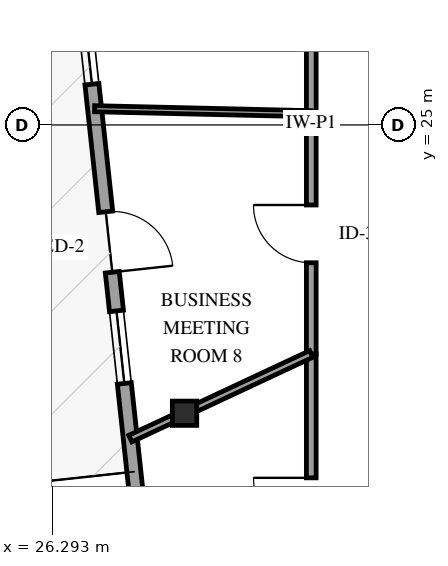
"""IFC4 building model, lengths in metres.
Left out: names, types, materials, properties, quantities, classifications, styles, units other than length and angle.
Written with IfcOpenShell. Run it as: python <this file> out.ifc"""

import sys

from ifc_helpers import new_model, si_unit, direction, frame, frame_2d, origin, origin_2d, place, context, subcontext, project, spatial, rectangle, i_section, extrude, element, fill, save


model = new_model("IFC4")
c1 = context("Model", 3, precision=1e-05, world=origin(), true_north=direction((0.0, 1.0)))
c2 = subcontext(c1, "Body", "Model", "MODEL_VIEW")
j1 = project(units=[si_unit("LENGTHUNIT", "METRE"), si_unit("PLANEANGLEUNIT", "RADIAN")], contexts=[c1])
p1 = place(None, origin())
s1 = spatial("IfcSite", under=j1, at=p1, CompositionType="ELEMENT")
p2 = place(p1, origin())
s2 = spatial("IfcBuilding", under=s1, at=p2, CompositionType="ELEMENT")
p3 = place(p2, frame((0.0, 0.0, 253.75)))
s3 = spatial("IfcBuildingStorey", under=s2, at=p3, CompositionType="ELEMENT", Elevation=253.75)
p4 = place(p3, frame((28.466, 20.259, 0.0), z_axis=(0.0, 0.0, 1.0), x_axis=(1.0, 0.0, 0.0)))
e1 = element("IfcColumn", 1, at=p4, inside=s3, PredefinedType="COLUMN", context=c2, shape_type="SweptSolid", body=[
    extrude(i_section(OverallWidth=0.401, OverallDepth=0.399, WebThickness=0.025, FlangeThickness=0.04, FilletRadius=0.038, at=origin_2d()), origin(), (0.0, 0.0, 1.0), 3.75),
])
p5 = place(p3, frame((26.767, 27.3, 0.0), z_axis=(0.0, 0.0, 1.0), x_axis=(0.107656797247, -0.994188118017, 0.0)))
e2 = element("IfcWall", 2, at=p5, inside=s3, PredefinedType="SOLIDWALL", context=c2, shape_type="SweptSolid", body=[
    extrude(rectangle(XDim=8.5, YDim=0.23, at=frame_2d((4.25, 0.0))), origin(), (0.0, 0.0, 1.0), 2.829),
])
p6 = place(p5, frame((3.75, 0.0, 0.0)))
e3 = element("IfcOpeningElement", 3, at=p6, cuts=e2, PredefinedType="OPENING", context=c2, shape_type="SweptSolid", body=[
    extrude(rectangle(XDim=1.0, YDim=2.15, at=frame_2d((0.5, 1.075))), frame((0.0, 0.125, 0.0), z_axis=(0.0, -1.0, 0.0), x_axis=(1.0, 0.0, 0.0)), (0.0, 0.0, 1.0), 0.25),
])
p7 = place(p5, frame((0.44, 0.0, 0.72)))
e4 = element("IfcOpeningElement", 4, at=p7, cuts=e2, PredefinedType="OPENING", context=c2, shape_type="SweptSolid", body=[
    extrude(rectangle(XDim=1.2, YDim=1.6, at=frame_2d((0.6, 0.8))), frame((0.0, 0.125, 0.0), z_axis=(0.0, -1.0, 0.0), x_axis=(1.0, 0.0, 0.0)), (0.0, 0.0, 1.0), 0.25),
])
p8 = place(p5, frame((5.39, 0.0, 0.72)))
e5 = element("IfcOpeningElement", 5, at=p8, cuts=e2, PredefinedType="OPENING", context=c2, shape_type="SweptSolid", body=[
    extrude(rectangle(XDim=1.2, YDim=1.6, at=frame_2d((0.6, 0.8))), frame((0.0, 0.125, 0.0), z_axis=(0.0, -1.0, 0.0), x_axis=(1.0, 0.0, 0.0)), (0.0, 0.0, 1.0), 0.25),
])
p9 = place(p3, frame((30.55, 25.185, 0.0), z_axis=(0.0, 0.0, 1.0), x_axis=(0.0, 1.0, 0.0)))
e6 = element("IfcWall", 6, at=p9, inside=s3, PredefinedType="PARTITIONING", context=c2, shape_type="SweptSolid", body=[
    extrude(rectangle(XDim=10.56, YDim=0.16, at=frame_2d((5.28, 0.0))), origin(), (0.0, 0.0, 1.0), 3.45),
])
p10 = place(p9, frame((1.109, 0.0, 0.0)))
e7 = element("IfcOpeningElement", 7, at=p10, cuts=e6, PredefinedType="OPENING", context=c2, shape_type="SweptSolid", body=[
    extrude(rectangle(XDim=0.95, YDim=2.15, at=frame_2d((0.475, 1.075))), frame((0.0, 0.09, 0.0), z_axis=(0.0, -1.0, 0.0), x_axis=(1.0, 0.0, 0.0)), (0.0, 0.0, 1.0), 0.18),
])
p11 = place(p3, frame((30.55, 16.21, 0.0), z_axis=(0.0, 0.0, 1.0), x_axis=(0.0, 1.0, 0.0)))
e8 = element("IfcWall", 8, at=p11, inside=s3, PredefinedType="PARTITIONING", context=c2, shape_type="SweptSolid", body=[
    extrude(rectangle(XDim=5.024, YDim=0.16, at=frame_2d((2.512, 0.0))), origin(), (0.0, 0.0, 1.0), 3.45),
])
p12 = place(p11, frame((2.037, 0.0, 0.0)))
e9 = element("IfcOpeningElement", 9, at=p12, cuts=e8, PredefinedType="OPENING", context=c2, shape_type="SweptSolid", body=[
    extrude(rectangle(XDim=0.95, YDim=2.15, at=frame_2d((0.475, 1.075))), frame((0.0, 0.09, 0.0), z_axis=(0.0, -1.0, 0.0), x_axis=(1.0, 0.0, 0.0)), (0.0, 0.0, 1.0), 0.18),
])
p13 = place(p3, frame((30.55, 21.234, 0.0), z_axis=(0.0, 0.0, 1.0), x_axis=(0.0, 1.0, 0.0)))
e10 = element("IfcWall", 10, at=p13, inside=s3, PredefinedType="PARTITIONING", context=c2, shape_type="SweptSolid", body=[
    extrude(rectangle(XDim=3.951, YDim=0.16, at=frame_2d((1.976, 0.0))), origin(), (0.0, 0.0, 1.0), 3.45),
])
p14 = place(p13, frame((1.5, 0.0, 0.0)))
e11 = element("IfcOpeningElement", 11, at=p14, cuts=e10, PredefinedType="OPENING", context=c2, shape_type="SweptSolid", body=[
    extrude(rectangle(XDim=0.95, YDim=2.15, at=frame_2d((0.475, 1.075))), frame((0.0, 0.09, 0.0), z_axis=(0.0, -1.0, 0.0), x_axis=(1.0, 0.0, 0.0)), (0.0, 0.0, 1.0), 0.18),
])
p15 = place(p3, frame((30.55, 25.185, 0.0), z_axis=(0.0, 0.0, 1.0), x_axis=(-0.999735072364, 0.023017060731, 0.0)))
e12 = element("IfcWall", 12, at=p15, inside=s3, PredefinedType="PARTITIONING", context=c2, shape_type="SweptSolid", body=[
    extrude(rectangle(XDim=3.564, YDim=0.1, at=frame_2d((1.782, 0.0))), origin(), (0.0, 0.0, 1.0), 3.45),
])
p16 = place(p3, frame((30.55, 21.234, 0.0), z_axis=(0.0, 0.0, 1.0), x_axis=(-0.905831620634, -0.423637905598, 0.0)))
e13 = element("IfcWall", 13, at=p16, inside=s3, PredefinedType="PARTITIONING", context=c2, shape_type="SweptSolid", body=[
    extrude(rectangle(XDim=3.285, YDim=0.12, at=frame_2d((1.643, 0.0))), origin(), (0.0, 0.0, 1.0), 3.45),
])
p17 = place(p6, origin())
e14 = element("IfcDoor", 14, at=p17, inside=s3, OperationType="SINGLE_SWING_RIGHT", PredefinedType="DOOR", context=c2, shape_type="SweptSolid", body=[
    extrude(rectangle(XDim=1.0, YDim=2.15, at=frame_2d((0.5, 1.075))), frame((0.0, 0.025, 0.0), z_axis=(0.0, -1.0, 0.0), x_axis=(1.0, 0.0, 0.0)), (0.0, 0.0, 1.0), 0.05),
])
fill(e3, e14)
p18 = place(p7, origin())
e15 = element("IfcWindow", 15, at=p18, inside=s3, PartitioningType="SINGLE_PANEL", PredefinedType="WINDOW", context=c2, shape_type="SweptSolid", body=[
    extrude(rectangle(XDim=1.2, YDim=1.6, at=frame_2d((0.6, 0.8))), frame((0.0, 0.03, 0.0), z_axis=(0.0, -1.0, 0.0), x_axis=(1.0, 0.0, 0.0)), (0.0, 0.0, 1.0), 0.06),
])
fill(e4, e15)
p19 = place(p8, origin())
e16 = element("IfcWindow", 16, at=p19, inside=s3, PartitioningType="SINGLE_PANEL", PredefinedType="WINDOW", context=c2, shape_type="SweptSolid", body=[
    extrude(rectangle(XDim=1.2, YDim=1.6, at=frame_2d((0.6, 0.8))), frame((0.0, 0.03, 0.0), z_axis=(0.0, -1.0, 0.0), x_axis=(1.0, 0.0, 0.0)), (0.0, 0.0, 1.0), 0.06),
])
fill(e5, e16)
p20 = place(p12, origin())
e17 = element("IfcDoor", 17, at=p20, inside=s3, OperationType="SINGLE_SWING_RIGHT", PredefinedType="DOOR", context=c2, shape_type="SweptSolid", body=[
    extrude(rectangle(XDim=0.95, YDim=2.15, at=frame_2d((0.475, 1.075))), frame((0.0, 0.025, 0.0), z_axis=(0.0, -1.0, 0.0), x_axis=(1.0, 0.0, 0.0)), (0.0, 0.0, 1.0), 0.05),
])
fill(e9, e17)
p21 = place(p14, origin())
e18 = element("IfcDoor", 18, at=p21, inside=s3, OperationType="SINGLE_SWING_RIGHT", PredefinedType="DOOR", context=c2, shape_type="SweptSolid", body=[
    extrude(rectangle(XDim=0.95, YDim=2.15, at=frame_2d((0.475, 1.075))), frame((0.0, 0.025, 0.0), z_axis=(0.0, -1.0, 0.0), x_axis=(1.0, 0.0, 0.0)), (0.0, 0.0, 1.0), 0.05),
])
fill(e11, e18)
save(model, sys.argv[1])
